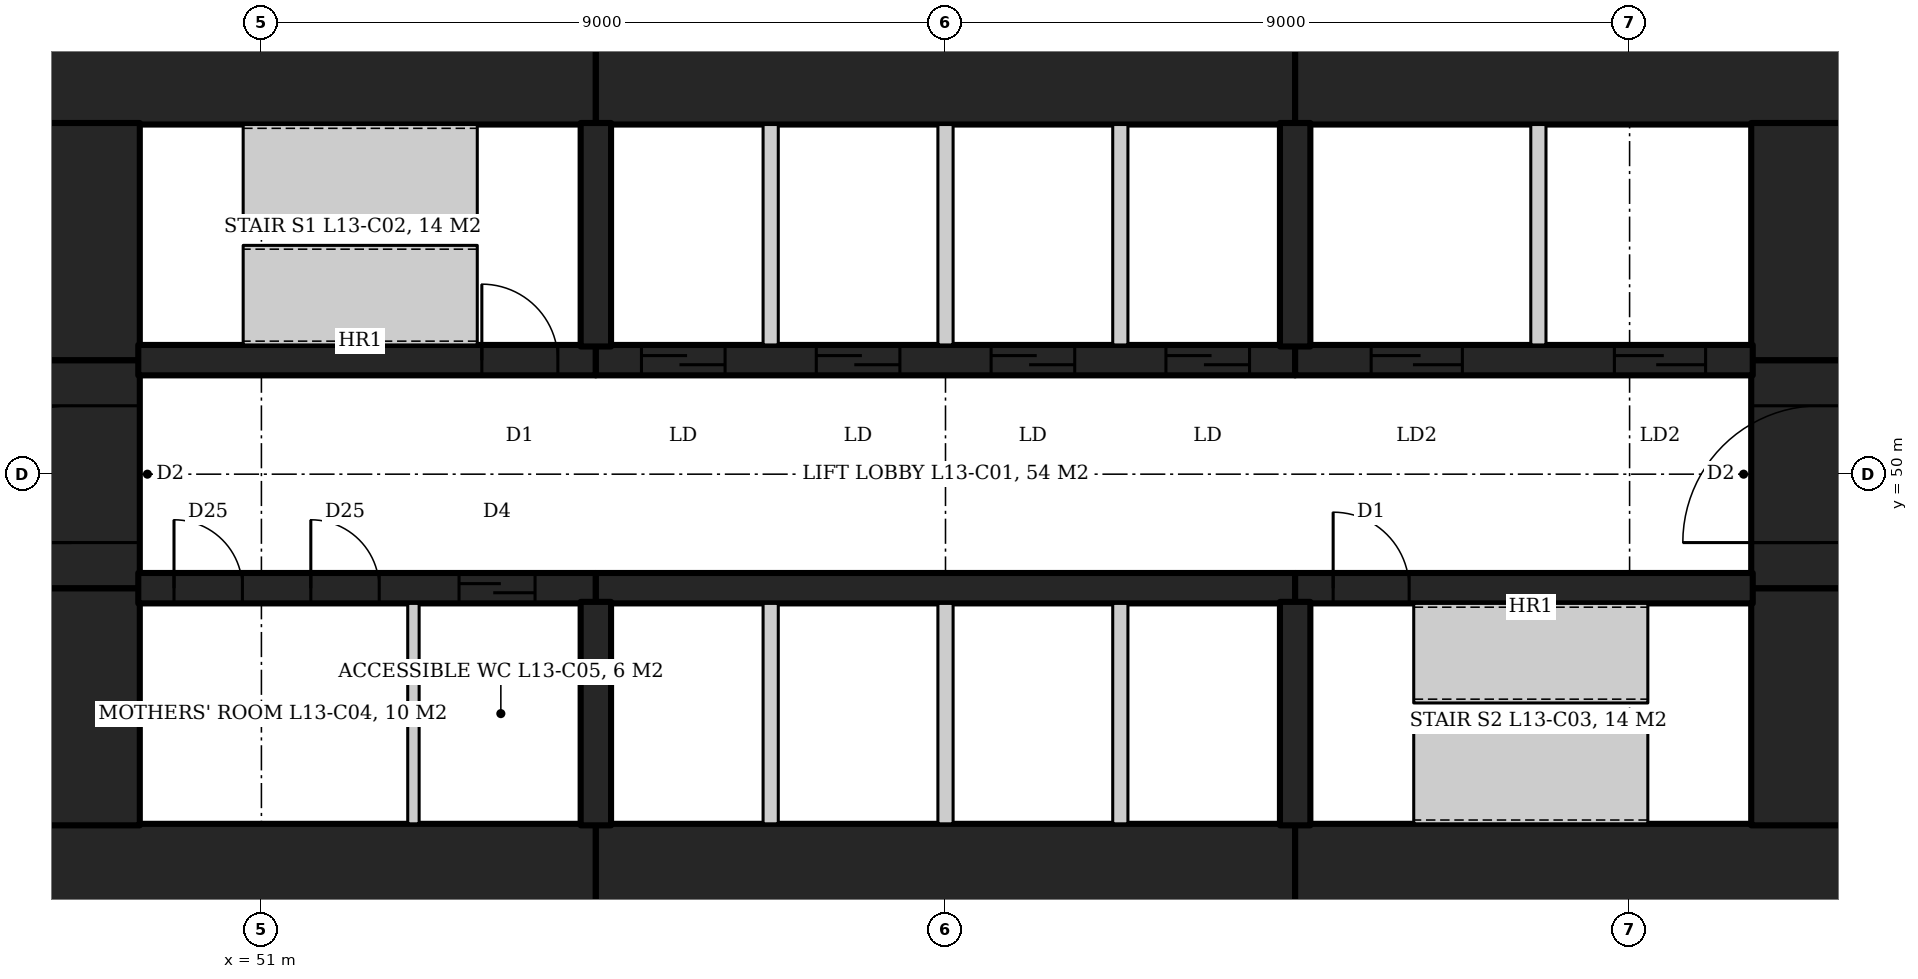
"""IFC4 building model, lengths in metres.
Left out: names, types, materials, properties, quantities, classifications, styles, units other than length and angle.
Written with IfcOpenShell. Run it as: python <this file> out.ifc"""

import sys

from ifc_helpers import new_model, si_unit, direction, frame, frame_2d, origin, place, context, subcontext, project, spatial, rectangle, extrude, element, fill, save


model = new_model("IFC4")
c1 = context("Model", 3, precision=1e-05, world=origin(), true_north=direction((0.0, 1.0)))
c2 = subcontext(c1, "Body", "Model", "MODEL_VIEW")
j1 = project(units=[si_unit("LENGTHUNIT", "METRE"), si_unit("PLANEANGLEUNIT", "RADIAN")], contexts=[c1])
p1 = place(None, origin())
s1 = spatial("IfcSite", under=j1, at=p1, CompositionType="ELEMENT")
p2 = place(p1, origin())
s2 = spatial("IfcBuilding", under=s1, at=p2, CompositionType="ELEMENT")
p3 = place(p2, frame((0.0, 0.0, 55.4)))
s3 = spatial("IfcBuildingStorey", under=s2, at=p3, CompositionType="ELEMENT", Elevation=55.4)
p4 = place(p3, frame((47.6, 55.5, 0.0), z_axis=(0.0, 0.0, 1.0), x_axis=(1.0, 0.0, 0.0)))
e1 = element("IfcWall", 1, at=p4, inside=s3, PredefinedType="SHEAR", context=c2, shape_type="SweptSolid", body=[
    extrude(rectangle(XDim=7.8, YDim=1.8, at=frame_2d((3.9, 0.0))), origin(), (0.0, 0.0, 1.0), 4.2),
])
p5 = place(p3, frame((55.4, 55.5, 0.0), z_axis=(0.0, 0.0, 1.0), x_axis=(1.0, 0.0, 0.0)))
e2 = element("IfcWall", 2, at=p5, inside=s3, PredefinedType="SHEAR", context=c2, shape_type="SweptSolid", body=[
    extrude(rectangle(XDim=9.2, YDim=1.8, at=frame_2d((4.6, 0.0))), origin(), (0.0, 0.0, 1.0), 4.2),
])
for number, where, z_axis, x_axis in (
    (3, (64.6, 55.5, 0.0), (0.0, 0.0, 1.0), (1.0, 0.0, 0.0)),
    (4, (47.6, 44.5, 0.0), (0.0, 0.0, 1.0), (1.0, 0.0, 0.0)),
):
    element("IfcWall", number, at=place(p3, frame(where, z_axis=z_axis, x_axis=x_axis)), inside=s3, PredefinedType="SHEAR", context=c2, shape_type="SweptSolid", body=[
        extrude(rectangle(XDim=7.8, YDim=1.8, at=frame_2d((3.9, 0.0))), origin(), (0.0, 0.0, 1.0), 4.2),
    ])
p6 = place(p3, frame((55.4, 44.5, 0.0), z_axis=(0.0, 0.0, 1.0), x_axis=(1.0, 0.0, 0.0)))
e5 = element("IfcWall", 5, at=p6, inside=s3, PredefinedType="SHEAR", context=c2, shape_type="SweptSolid", body=[
    extrude(rectangle(XDim=9.2, YDim=1.8, at=frame_2d((4.6, 0.0))), origin(), (0.0, 0.0, 1.0), 4.2),
])
p7 = place(p3, frame((64.6, 44.5, 0.0), z_axis=(0.0, 0.0, 1.0), x_axis=(1.0, 0.0, 0.0)))
e6 = element("IfcWall", 6, at=p7, inside=s3, PredefinedType="SHEAR", context=c2, shape_type="SweptSolid", body=[
    extrude(rectangle(XDim=7.8, YDim=1.8, at=frame_2d((3.9, 0.0))), origin(), (0.0, 0.0, 1.0), 4.2),
])
p8 = place(p3, frame((71.5, 45.38, 0.0), z_axis=(0.0, 0.0, 1.0), x_axis=(0.0, 1.0, 0.0)))
e7 = element("IfcWall", 7, at=p8, inside=s3, PredefinedType="SHEAR", context=c2, shape_type="SweptSolid", body=[
    extrude(rectangle(XDim=3.12, YDim=1.8, at=frame_2d((1.56, 0.0))), origin(), (0.0, 0.0, 1.0), 4.2),
])
p9 = place(p3, frame((71.5, 48.5, 0.0), z_axis=(0.0, 0.0, 1.0), x_axis=(0.0, 1.0, 0.0)))
e8 = element("IfcWall", 8, at=p9, inside=s3, PredefinedType="SHEAR", context=c2, shape_type="SweptSolid", body=[
    extrude(rectangle(XDim=3.0, YDim=1.8, at=frame_2d((1.5, 0.0))), origin(), (0.0, 0.0, 1.0), 4.2),
])
p10 = place(p9, frame((0.6, 0.0, 0.0)))
e9 = element("IfcOpeningElement", 9, at=p10, cuts=e8, PredefinedType="OPENING", context=c2, shape_type="SweptSolid", body=[
    extrude(rectangle(XDim=1.8, YDim=2.1, at=frame_2d((0.9, 1.05))), frame((0.0, 0.91, 0.0), z_axis=(0.0, -1.0, 0.0), x_axis=(1.0, 0.0, 0.0)), (0.0, 0.0, 1.0), 1.82),
])
for number, where, z_axis, x_axis in (
    (10, (71.5, 51.5, 0.0), (0.0, 0.0, 1.0), (0.0, 1.0, 0.0)),
    (11, (48.5, 45.38, 0.0), (0.0, 0.0, 1.0), (0.0, 1.0, 0.0)),
):
    element("IfcWall", number, at=place(p3, frame(where, z_axis=z_axis, x_axis=x_axis)), inside=s3, PredefinedType="SHEAR", context=c2, shape_type="SweptSolid", body=[
        extrude(rectangle(XDim=3.12, YDim=1.8, at=frame_2d((1.56, 0.0))), origin(), (0.0, 0.0, 1.0), 4.2),
    ])
p11 = place(p3, frame((48.5, 48.5, 0.0), z_axis=(0.0, 0.0, 1.0), x_axis=(0.0, 1.0, 0.0)))
e12 = element("IfcWall", 12, at=p11, inside=s3, PredefinedType="SHEAR", context=c2, shape_type="SweptSolid", body=[
    extrude(rectangle(XDim=3.0, YDim=1.8, at=frame_2d((1.5, 0.0))), origin(), (0.0, 0.0, 1.0), 4.2),
])
p12 = place(p11, frame((0.6, 0.0, 0.0)))
e13 = element("IfcOpeningElement", 13, at=p12, cuts=e12, PredefinedType="OPENING", context=c2, shape_type="SweptSolid", body=[
    extrude(rectangle(XDim=1.8, YDim=2.1, at=frame_2d((0.9, 1.05))), frame((0.0, 0.91, 0.0), z_axis=(0.0, -1.0, 0.0), x_axis=(1.0, 0.0, 0.0)), (0.0, 0.0, 1.0), 1.82),
])
p13 = place(p3, frame((48.5, 51.5, 0.0), z_axis=(0.0, 0.0, 1.0), x_axis=(0.0, 1.0, 0.0)))
e14 = element("IfcWall", 14, at=p13, inside=s3, PredefinedType="SHEAR", context=c2, shape_type="SweptSolid", body=[
    extrude(rectangle(XDim=3.12, YDim=1.8, at=frame_2d((1.56, 0.0))), origin(), (0.0, 0.0, 1.0), 4.2),
])
p14 = place(p3, frame((49.38, 51.5, 0.0), z_axis=(0.0, 0.0, 1.0), x_axis=(1.0, 0.0, 0.0)))
e15 = element("IfcWall", 15, at=p14, inside=s3, PredefinedType="SHEAR", context=c2, shape_type="SweptSolid", body=[
    extrude(rectangle(XDim=6.02, YDim=0.4, at=frame_2d((3.01, 0.0))), origin(), (0.0, 0.0, 1.0), 4.2),
])
p15 = place(p14, frame((4.52, 0.0, 0.0)))
e16 = element("IfcOpeningElement", 16, at=p15, cuts=e15, PredefinedType="OPENING", context=c2, shape_type="SweptSolid", body=[
    extrude(rectangle(XDim=1.0, YDim=2.1, at=frame_2d((0.5, 1.05))), frame((0.0, 0.21, 0.0), z_axis=(0.0, -1.0, 0.0), x_axis=(1.0, 0.0, 0.0)), (0.0, 0.0, 1.0), 0.42),
])
p16 = place(p3, frame((55.4, 51.5, 0.0), z_axis=(0.0, 0.0, 1.0), x_axis=(1.0, 0.0, 0.0)))
e17 = element("IfcWall", 17, at=p16, inside=s3, PredefinedType="SHEAR", context=c2, shape_type="SweptSolid", body=[
    extrude(rectangle(XDim=9.2, YDim=0.4, at=frame_2d((4.6, 0.0))), origin(), (0.0, 0.0, 1.0), 4.2),
])
p17 = place(p16, frame((0.6, 0.0, 0.0)))
e18 = element("IfcOpeningElement", 18, at=p17, cuts=e17, PredefinedType="OPENING", context=c2, shape_type="SweptSolid", body=[
    extrude(rectangle(XDim=1.1, YDim=2.1, at=frame_2d((0.55, 1.05))), frame((0.0, 0.21, 0.0), z_axis=(0.0, -1.0, 0.0), x_axis=(1.0, 0.0, 0.0)), (0.0, 0.0, 1.0), 0.42),
])
p18 = place(p16, frame((2.9, 0.0, 0.0)))
e19 = element("IfcOpeningElement", 19, at=p18, cuts=e17, PredefinedType="OPENING", context=c2, shape_type="SweptSolid", body=[
    extrude(rectangle(XDim=1.1, YDim=2.1, at=frame_2d((0.55, 1.05))), frame((0.0, 0.21, 0.0), z_axis=(0.0, -1.0, 0.0), x_axis=(1.0, 0.0, 0.0)), (0.0, 0.0, 1.0), 0.42),
])
p19 = place(p16, frame((5.2, 0.0, 0.0)))
e20 = element("IfcOpeningElement", 20, at=p19, cuts=e17, PredefinedType="OPENING", context=c2, shape_type="SweptSolid", body=[
    extrude(rectangle(XDim=1.1, YDim=2.1, at=frame_2d((0.55, 1.05))), frame((0.0, 0.21, 0.0), z_axis=(0.0, -1.0, 0.0), x_axis=(1.0, 0.0, 0.0)), (0.0, 0.0, 1.0), 0.42),
])
p20 = place(p16, frame((7.5, 0.0, 0.0)))
e21 = element("IfcOpeningElement", 21, at=p20, cuts=e17, PredefinedType="OPENING", context=c2, shape_type="SweptSolid", body=[
    extrude(rectangle(XDim=1.1, YDim=2.1, at=frame_2d((0.55, 1.05))), frame((0.0, 0.21, 0.0), z_axis=(0.0, -1.0, 0.0), x_axis=(1.0, 0.0, 0.0)), (0.0, 0.0, 1.0), 0.42),
])
p21 = place(p3, frame((64.6, 51.5, 0.0), z_axis=(0.0, 0.0, 1.0), x_axis=(1.0, 0.0, 0.0)))
e22 = element("IfcWall", 22, at=p21, inside=s3, PredefinedType="SHEAR", context=c2, shape_type="SweptSolid", body=[
    extrude(rectangle(XDim=6.02, YDim=0.4, at=frame_2d((3.01, 0.0))), origin(), (0.0, 0.0, 1.0), 4.2),
])
p22 = place(p21, frame((1.0, 0.0, 0.0)))
e23 = element("IfcOpeningElement", 23, at=p22, cuts=e22, PredefinedType="OPENING", context=c2, shape_type="SweptSolid", body=[
    extrude(rectangle(XDim=1.2, YDim=2.1, at=frame_2d((0.6, 1.05))), frame((0.0, 0.21, 0.0), z_axis=(0.0, -1.0, 0.0), x_axis=(1.0, 0.0, 0.0)), (0.0, 0.0, 1.0), 0.42),
])
p23 = place(p21, frame((4.2, 0.0, 0.0)))
e24 = element("IfcOpeningElement", 24, at=p23, cuts=e22, PredefinedType="OPENING", context=c2, shape_type="SweptSolid", body=[
    extrude(rectangle(XDim=1.2, YDim=2.1, at=frame_2d((0.6, 1.05))), frame((0.0, 0.21, 0.0), z_axis=(0.0, -1.0, 0.0), x_axis=(1.0, 0.0, 0.0)), (0.0, 0.0, 1.0), 0.42),
])
p24 = place(p3, frame((49.38, 48.5, 0.0), z_axis=(0.0, 0.0, 1.0), x_axis=(1.0, 0.0, 0.0)))
e25 = element("IfcWall", 25, at=p24, inside=s3, PredefinedType="SHEAR", context=c2, shape_type="SweptSolid", body=[
    extrude(rectangle(XDim=6.02, YDim=0.4, at=frame_2d((3.01, 0.0))), origin(), (0.0, 0.0, 1.0), 4.2),
])
p25 = place(p24, frame((0.47, 0.0, 0.0)))
e26 = element("IfcOpeningElement", 26, at=p25, cuts=e25, PredefinedType="OPENING", context=c2, shape_type="SweptSolid", body=[
    extrude(rectangle(XDim=0.9, YDim=2.1, at=frame_2d((0.45, 1.05))), frame((0.0, 0.21, 0.0), z_axis=(0.0, -1.0, 0.0), x_axis=(1.0, 0.0, 0.0)), (0.0, 0.0, 1.0), 0.42),
])
p26 = place(p24, frame((2.27, 0.0, 0.0)))
e27 = element("IfcOpeningElement", 27, at=p26, cuts=e25, PredefinedType="OPENING", context=c2, shape_type="SweptSolid", body=[
    extrude(rectangle(XDim=0.9, YDim=2.1, at=frame_2d((0.45, 1.05))), frame((0.0, 0.21, 0.0), z_axis=(0.0, -1.0, 0.0), x_axis=(1.0, 0.0, 0.0)), (0.0, 0.0, 1.0), 0.42),
])
p27 = place(p24, frame((4.22, 0.0, 0.0)))
e28 = element("IfcOpeningElement", 28, at=p27, cuts=e25, PredefinedType="OPENING", context=c2, shape_type="SweptSolid", body=[
    extrude(rectangle(XDim=1.0, YDim=2.1, at=frame_2d((0.5, 1.05))), frame((0.0, 0.21, 0.0), z_axis=(0.0, -1.0, 0.0), x_axis=(1.0, 0.0, 0.0)), (0.0, 0.0, 1.0), 0.42),
])
p28 = place(p3, frame((55.4, 48.5, 0.0), z_axis=(0.0, 0.0, 1.0), x_axis=(1.0, 0.0, 0.0)))
e29 = element("IfcWall", 29, at=p28, inside=s3, PredefinedType="SHEAR", context=c2, shape_type="SweptSolid", body=[
    extrude(rectangle(XDim=9.2, YDim=0.4, at=frame_2d((4.6, 0.0))), origin(), (0.0, 0.0, 1.0), 4.2),
])
p29 = place(p3, frame((64.6, 48.5, 0.0), z_axis=(0.0, 0.0, 1.0), x_axis=(1.0, 0.0, 0.0)))
e30 = element("IfcWall", 30, at=p29, inside=s3, PredefinedType="SHEAR", context=c2, shape_type="SweptSolid", body=[
    extrude(rectangle(XDim=6.02, YDim=0.4, at=frame_2d((3.01, 0.0))), origin(), (0.0, 0.0, 1.0), 4.2),
])
p30 = place(p29, frame((0.5, 0.0, 0.0)))
e31 = element("IfcOpeningElement", 31, at=p30, cuts=e30, PredefinedType="OPENING", context=c2, shape_type="SweptSolid", body=[
    extrude(rectangle(XDim=1.0, YDim=2.1, at=frame_2d((0.5, 1.05))), frame((0.0, 0.21, 0.0), z_axis=(0.0, -1.0, 0.0), x_axis=(1.0, 0.0, 0.0)), (0.0, 0.0, 1.0), 0.42),
])
for number, where, z_axis, x_axis in (
    (32, (55.4, 51.68, 0.0), (0.0, 0.0, 1.0), (0.0, 1.0, 0.0)),
    (33, (64.6, 51.68, 0.0), (0.0, 0.0, 1.0), (0.0, 1.0, 0.0)),
    (34, (55.4, 48.32, 0.0), (0.0, 0.0, 1.0), (0.0, -1.0, 0.0)),
    (35, (64.6, 48.32, 0.0), (0.0, 0.0, 1.0), (0.0, -1.0, 0.0)),
):
    element("IfcWall", number, at=place(p3, frame(where, z_axis=z_axis, x_axis=x_axis)), inside=s3, PredefinedType="SHEAR", context=c2, shape_type="SweptSolid", body=[
        extrude(rectangle(XDim=2.94, YDim=0.4, at=frame_2d((1.47, 0.0))), origin(), (0.0, 0.0, 1.0), 4.2),
    ])
for number, where, z_axis, x_axis in (
    (36, (57.7, 51.7, 0.0), (0.0, 0.0, 1.0), (0.0, 1.0, 0.0)),
    (37, (60.0, 51.7, 0.0), (0.0, 0.0, 1.0), (0.0, 1.0, 0.0)),
    (38, (62.3, 51.7, 0.0), (0.0, 0.0, 1.0), (0.0, 1.0, 0.0)),
    (39, (57.7, 45.4, 0.0), (0.0, 0.0, 1.0), (0.0, 1.0, 0.0)),
    (40, (60.0, 45.4, 0.0), (0.0, 0.0, 1.0), (0.0, 1.0, 0.0)),
    (41, (62.3, 45.4, 0.0), (0.0, 0.0, 1.0), (0.0, 1.0, 0.0)),
    (42, (67.8, 51.7, 0.0), (0.0, 0.0, 1.0), (0.0, 1.0, 0.0)),
):
    element("IfcWall", number, at=place(p3, frame(where, z_axis=z_axis, x_axis=x_axis)), inside=s3, PredefinedType="PARTITIONING", context=c2, shape_type="SweptSolid", body=[
        extrude(rectangle(XDim=2.9, YDim=0.2, at=frame_2d((1.45, 0.0))), origin(), (0.0, 0.0, 1.0), 4.2),
    ])
p31 = place(p3, frame((53.0, 45.4, 0.0), z_axis=(0.0, 0.0, 1.0), x_axis=(0.0, 1.0, 0.0)))
e43 = element("IfcWall", 43, at=p31, inside=s3, PredefinedType="PARTITIONING", context=c2, shape_type="SweptSolid", body=[
    extrude(rectangle(XDim=2.9, YDim=0.15, at=frame_2d((1.45, 0.0))), origin(), (0.0, 0.0, 1.0), 4.04),
])
p32 = place(p15, origin())
e44 = element("IfcDoor", 44, at=p32, inside=s3, OperationType="SINGLE_SWING_LEFT", PredefinedType="DOOR", context=c2, shape_type="SweptSolid", body=[
    extrude(rectangle(XDim=1.0, YDim=2.1, at=frame_2d((0.5, 1.05))), frame((0.0, 0.025, 0.0), z_axis=(0.0, -1.0, 0.0), x_axis=(1.0, 0.0, 0.0)), (0.0, 0.0, 1.0), 0.05),
])
fill(e16, e44)
p33 = place(p30, origin())
e45 = element("IfcDoor", 45, at=p33, inside=s3, OperationType="SINGLE_SWING_LEFT", PredefinedType="DOOR", context=c2, shape_type="SweptSolid", body=[
    extrude(rectangle(XDim=1.0, YDim=2.1, at=frame_2d((0.5, 1.05))), frame((0.0, 0.025, 0.0), z_axis=(0.0, -1.0, 0.0), x_axis=(1.0, 0.0, 0.0)), (0.0, 0.0, 1.0), 0.05),
])
fill(e31, e45)
p34 = place(p22, origin())
e46 = element("IfcDoor", 46, at=p34, inside=s3, OperationType="SLIDING_TO_LEFT", PredefinedType="DOOR", context=c2, shape_type="SweptSolid", body=[
    extrude(rectangle(XDim=1.2, YDim=2.1, at=frame_2d((0.6, 1.05))), frame((0.0, 0.025, 0.0), z_axis=(0.0, -1.0, 0.0), x_axis=(1.0, 0.0, 0.0)), (0.0, 0.0, 1.0), 0.05),
])
fill(e23, e46)
p35 = place(p23, origin())
e47 = element("IfcDoor", 47, at=p35, inside=s3, OperationType="SLIDING_TO_LEFT", PredefinedType="DOOR", context=c2, shape_type="SweptSolid", body=[
    extrude(rectangle(XDim=1.2, YDim=2.1, at=frame_2d((0.6, 1.05))), frame((0.0, 0.025, 0.0), z_axis=(0.0, -1.0, 0.0), x_axis=(1.0, 0.0, 0.0)), (0.0, 0.0, 1.0), 0.05),
])
fill(e24, e47)
p36 = place(p17, origin())
e48 = element("IfcDoor", 48, at=p36, inside=s3, OperationType="SLIDING_TO_LEFT", PredefinedType="DOOR", context=c2, shape_type="SweptSolid", body=[
    extrude(rectangle(XDim=1.1, YDim=2.1, at=frame_2d((0.55, 1.05))), frame((0.0, 0.025, 0.0), z_axis=(0.0, -1.0, 0.0), x_axis=(1.0, 0.0, 0.0)), (0.0, 0.0, 1.0), 0.05),
])
fill(e18, e48)
p37 = place(p18, origin())
e49 = element("IfcDoor", 49, at=p37, inside=s3, OperationType="SLIDING_TO_LEFT", PredefinedType="DOOR", context=c2, shape_type="SweptSolid", body=[
    extrude(rectangle(XDim=1.1, YDim=2.1, at=frame_2d((0.55, 1.05))), frame((0.0, 0.025, 0.0), z_axis=(0.0, -1.0, 0.0), x_axis=(1.0, 0.0, 0.0)), (0.0, 0.0, 1.0), 0.05),
])
fill(e19, e49)
p38 = place(p19, origin())
e50 = element("IfcDoor", 50, at=p38, inside=s3, OperationType="SLIDING_TO_LEFT", PredefinedType="DOOR", context=c2, shape_type="SweptSolid", body=[
    extrude(rectangle(XDim=1.1, YDim=2.1, at=frame_2d((0.55, 1.05))), frame((0.0, 0.025, 0.0), z_axis=(0.0, -1.0, 0.0), x_axis=(1.0, 0.0, 0.0)), (0.0, 0.0, 1.0), 0.05),
])
fill(e20, e50)
p39 = place(p20, origin())
e51 = element("IfcDoor", 51, at=p39, inside=s3, OperationType="SLIDING_TO_LEFT", PredefinedType="DOOR", context=c2, shape_type="SweptSolid", body=[
    extrude(rectangle(XDim=1.1, YDim=2.1, at=frame_2d((0.55, 1.05))), frame((0.0, 0.025, 0.0), z_axis=(0.0, -1.0, 0.0), x_axis=(1.0, 0.0, 0.0)), (0.0, 0.0, 1.0), 0.05),
])
fill(e21, e51)
p40 = place(p25, origin())
e52 = element("IfcDoor", 52, at=p40, inside=s3, OperationType="SINGLE_SWING_RIGHT", PredefinedType="DOOR", context=c2, shape_type="SweptSolid", body=[
    extrude(rectangle(XDim=0.9, YDim=2.1, at=frame_2d((0.45, 1.05))), frame((0.0, 0.025, 0.0), z_axis=(0.0, -1.0, 0.0), x_axis=(1.0, 0.0, 0.0)), (0.0, 0.0, 1.0), 0.05),
])
fill(e26, e52)
p41 = place(p26, origin())
e53 = element("IfcDoor", 53, at=p41, inside=s3, OperationType="SINGLE_SWING_RIGHT", PredefinedType="DOOR", context=c2, shape_type="SweptSolid", body=[
    extrude(rectangle(XDim=0.9, YDim=2.1, at=frame_2d((0.45, 1.05))), frame((0.0, 0.025, 0.0), z_axis=(0.0, -1.0, 0.0), x_axis=(1.0, 0.0, 0.0)), (0.0, 0.0, 1.0), 0.05),
])
fill(e27, e53)
p42 = place(p27, origin())
e54 = element("IfcDoor", 54, at=p42, inside=s3, OperationType="SLIDING_TO_LEFT", PredefinedType="DOOR", context=c2, shape_type="SweptSolid", body=[
    extrude(rectangle(XDim=1.0, YDim=2.1, at=frame_2d((0.5, 1.05))), frame((0.0, 0.025, 0.0), z_axis=(0.0, -1.0, 0.0), x_axis=(1.0, 0.0, 0.0)), (0.0, 0.0, 1.0), 0.05),
])
fill(e28, e54)
p43 = place(p10, origin())
e55 = element("IfcDoor", 55, at=p43, inside=s3, OperationType="DOUBLE_DOOR_DOUBLE_SWING", PredefinedType="DOOR", context=c2, shape_type="SweptSolid", body=[
    extrude(rectangle(XDim=1.8, YDim=2.1, at=frame_2d((0.9, 1.05))), frame((0.0, 0.025, 0.0), z_axis=(0.0, -1.0, 0.0), x_axis=(1.0, 0.0, 0.0)), (0.0, 0.0, 1.0), 0.05),
])
fill(e9, e55)
p44 = place(p12, origin())
e56 = element("IfcDoor", 56, at=p44, inside=s3, OperationType="DOUBLE_DOOR_DOUBLE_SWING", PredefinedType="DOOR", context=c2, shape_type="SweptSolid", body=[
    extrude(rectangle(XDim=1.8, YDim=2.1, at=frame_2d((0.9, 1.05))), frame((0.0, 0.025, 0.0), z_axis=(0.0, -1.0, 0.0), x_axis=(1.0, 0.0, 0.0)), (0.0, 0.0, 1.0), 0.05),
])
fill(e13, e56)
save(model, sys.argv[1])
